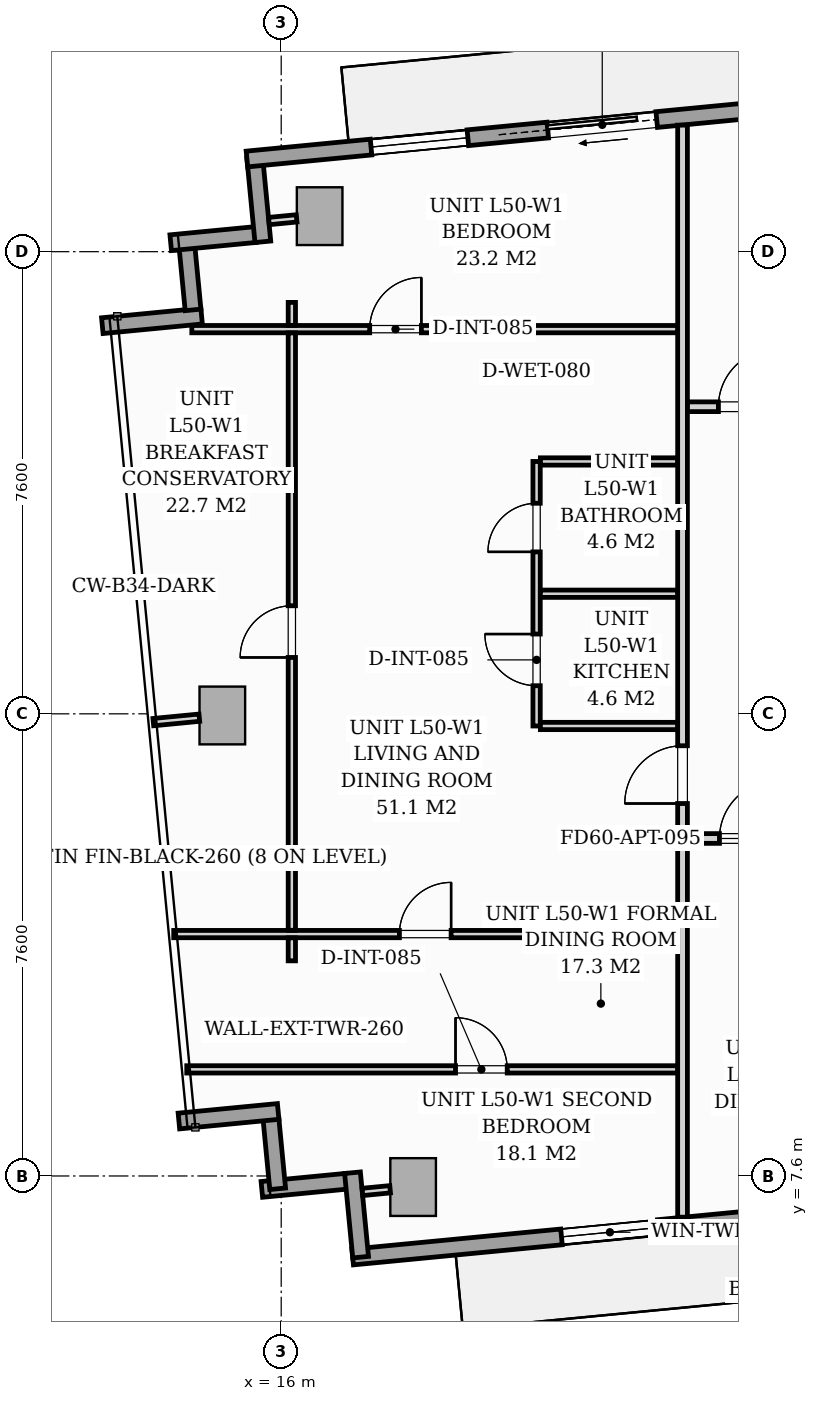
"""IFC4 building model, lengths in metres.
Left out: names, types, materials, properties, quantities, classifications, styles, units other than length and angle.
Written with IfcOpenShell. Run it as: python <this file> out.ifc"""

import sys

from ifc_helpers import new_model, si_unit, direction, frame, frame_2d, origin, origin_2d, place, context, subcontext, project, spatial, rectangle, extrude, source, transform, mapped, element, fill, save


model = new_model("IFC4")
c1 = context("Model", 3, precision=1e-05, world=origin(), true_north=direction((0.0, 1.0)))
c2 = subcontext(c1, "Body", "Model", "MODEL_VIEW")
j1 = project(units=[si_unit("LENGTHUNIT", "METRE"), si_unit("PLANEANGLEUNIT", "RADIAN")], contexts=[c1])
p1 = place(None, origin())
s1 = spatial("IfcSite", under=j1, at=p1, CompositionType="ELEMENT")
p2 = place(p1, origin())
s2 = spatial("IfcBuilding", under=s1, at=p2, CompositionType="ELEMENT")
p3 = place(p2, frame((0.0, 0.0, 176.2)))
s3 = spatial("IfcBuildingStorey", under=s2, at=p3, CompositionType="ELEMENT", Elevation=176.2)
m1 = source(origin(), c2, "Body", "SweptSolid", [
    extrude(rectangle(XDim=0.75, YDim=0.95, at=origin_2d()), origin(), (0.0, 0.0, 1.0), 3.196),
])
for number, where, z_axis, x_axis in (
    (1, (18.169, 7.418, 0.002), (0.0, 0.0, 1.0), (0.995, 0.096, 0.0)),
    (2, (16.632, 23.384, 0.002), (0.0, 0.0, 1.0), (0.995, 0.096, 0.0)),
    (3, (15.032, 15.173, 0.002), (0.0, 0.0, 1.0), (0.995, 0.096, 0.0)),
):
    element("IfcColumn", number, at=place(p3, frame(where, z_axis=z_axis, x_axis=x_axis)), inside=s3, PredefinedType="COLUMN", context=c2, shape_type="MappedRepresentation", body=[
        mapped(m1, transform((0.0, 0.0, 0.0), scale=1.0)),
    ])
p4 = place(p3, frame((17.07, 7.513, 0.0), z_axis=(0.0, 0.0, 1.0), x_axis=(-0.995391056452, -0.09589913835, 0.0)))
e4 = element("IfcWall", 4, at=p4, inside=s3, PredefinedType="STANDARD", context=c2, shape_type="SweptSolid", body=[
    extrude(rectangle(XDim=1.395, YDim=0.26, at=frame_2d((0.698, 0.0))), origin(), (0.0, 0.0, 1.0), 2.94),
])
p5 = place(p3, frame((15.942, 7.389, 0.0), z_axis=(0.0, 0.0, 1.0), x_axis=(-0.09576095695, 0.995404359607, 0.0)))
e5 = element("IfcWall", 5, at=p5, inside=s3, PredefinedType="STANDARD", context=c2, shape_type="SweptSolid", body=[
    extrude(rectangle(XDim=1.15, YDim=0.26, at=frame_2d((0.575, 0.0))), origin(), (0.0, 0.0, 1.0), 2.94),
])
for number, where, z_axis, x_axis in (
    (6, (15.95, 8.661, 0.0), (0.0, 0.0, 1.0), (-0.995, -0.096, 0.0)),
    (7, (13.058, 21.583, 0.0), (0.0, 0.0, 1.0), (0.995, 0.096, 0.0)),
):
    element("IfcWall", number, at=place(p3, frame(where, z_axis=z_axis, x_axis=x_axis)), inside=s3, PredefinedType="STANDARD", context=c2, shape_type="SweptSolid", body=[
        extrude(rectangle(XDim=1.64, YDim=0.26, at=frame_2d((0.82, 0.0))), origin(), (0.0, 0.0, 1.0), 2.94),
    ])
p6 = place(p3, frame((14.55, 21.843, 0.0), z_axis=(0.0, 0.0, 1.0), x_axis=(-0.09576095695, 0.995404359607, 0.0)))
e8 = element("IfcWall", 8, at=p6, inside=s3, PredefinedType="STANDARD", context=c2, shape_type="SweptSolid", body=[
    extrude(rectangle(XDim=1.15, YDim=0.26, at=frame_2d((0.575, 0.0))), origin(), (0.0, 0.0, 1.0), 2.94),
])
p7 = place(p3, frame((14.183, 22.947, 0.0), z_axis=(0.0, 0.0, 1.0), x_axis=(0.99540614245, 0.095742423056, 0.0)))
e9 = element("IfcWall", 9, at=p7, inside=s3, PredefinedType="STANDARD", context=c2, shape_type="SweptSolid", body=[
    extrude(rectangle(XDim=1.395, YDim=0.26, at=frame_2d((0.697, 0.0))), origin(), (0.0, 0.0, 1.0), 2.94),
])
p8 = place(p3, frame((15.698, 22.963, 0.0), z_axis=(0.0, 0.0, 1.0), x_axis=(-0.09589913835, 0.995391056452, 0.0)))
e10 = element("IfcWall", 10, at=p8, inside=s3, PredefinedType="STANDARD", context=c2, shape_type="SweptSolid", body=[
    extrude(rectangle(XDim=1.395, YDim=0.26, at=frame_2d((0.698, 0.0))), origin(), (0.0, 0.0, 1.0), 2.94),
])
p9 = place(p3, frame((15.437, 24.324, 0.0), z_axis=(0.0, 0.0, 1.0), x_axis=(0.995395627913, 0.095851676732, 0.0)))
e11 = element("IfcWall", 11, at=p9, inside=s3, PredefinedType="STANDARD", context=c2, shape_type="SweptSolid", body=[
    extrude(rectangle(XDim=16.1, YDim=0.26, at=frame_2d((8.05, 0.0))), origin(), (0.0, 0.0, 1.0), 2.94),
])
p10 = place(p9, frame((4.97, 0.0, 0.0)))
e12 = element("IfcOpeningElement", 12, at=p10, cuts=e11, PredefinedType="OPENING", context=c2, shape_type="SweptSolid", body=[
    extrude(rectangle(XDim=1.8, YDim=2.06, at=frame_2d((0.9, 1.03))), frame((0.0, 0.14, 0.0), z_axis=(0.0, -1.0, 0.0), x_axis=(1.0, 0.0, 0.0)), (0.0, 0.0, 1.0), 0.28),
])
p11 = place(p9, frame((2.05, 0.0, 0.65)))
e13 = element("IfcOpeningElement", 13, at=p11, cuts=e11, PredefinedType="OPENING", context=c2, shape_type="SweptSolid", body=[
    extrude(rectangle(XDim=1.6, YDim=1.5, at=frame_2d((0.8, 0.75))), frame((0.0, 0.14, 0.0), z_axis=(0.0, -1.0, 0.0), x_axis=(1.0, 0.0, 0.0)), (0.0, 0.0, 1.0), 0.28),
])
p12 = place(p3, frame((33.201, 7.81, 0.0), z_axis=(0.0, 0.0, 1.0), x_axis=(-0.995397074604, -0.095836652014, 0.0)))
e14 = element("IfcWall", 14, at=p12, inside=s3, PredefinedType="STANDARD", context=c2, shape_type="SweptSolid", body=[
    extrude(rectangle(XDim=16.1, YDim=0.26, at=frame_2d((8.05, 0.0))), origin(), (0.0, 0.0, 1.0), 2.94),
])
p13 = place(p12, frame((6.51, 0.0, 0.0)))
e15 = element("IfcOpeningElement", 15, at=p13, cuts=e14, PredefinedType="OPENING", context=c2, shape_type="SweptSolid", body=[
    extrude(rectangle(XDim=1.8, YDim=2.06, at=frame_2d((0.9, 1.03))), frame((0.0, 0.14, 0.0), z_axis=(0.0, -1.0, 0.0), x_axis=(1.0, 0.0, 0.0)), (0.0, 0.0, 1.0), 0.28),
])
p14 = place(p12, frame((11.05, 0.0, 0.65)))
e16 = element("IfcOpeningElement", 16, at=p14, cuts=e14, PredefinedType="OPENING", context=c2, shape_type="SweptSolid", body=[
    extrude(rectangle(XDim=1.6, YDim=1.5, at=frame_2d((0.8, 0.75))), frame((0.0, 0.14, 0.0), z_axis=(0.0, -1.0, 0.0), x_axis=(1.0, 0.0, 0.0)), (0.0, 0.0, 1.0), 0.28),
])
p15 = place(p12, frame((2.213, 0.0, 0.75)))
e17 = element("IfcOpeningElement", 17, at=p15, cuts=e14, PredefinedType="OPENING", context=c2, shape_type="SweptSolid", body=[
    extrude(rectangle(XDim=1.6, YDim=1.5, at=frame_2d((0.8, 0.75))), frame((0.0, 0.14, 0.0), z_axis=(0.0, -1.0, 0.0), x_axis=(1.0, 0.0, 0.0)), (0.0, 0.0, 1.0), 0.28),
])
p16 = place(p3, frame((17.306, 6.265, 0.0), z_axis=(0.0, 0.0, 1.0), x_axis=(-0.095915846097, 0.995389446633, 0.0)))
e18 = element("IfcWall", 18, at=p16, inside=s3, PredefinedType="STANDARD", context=c2, shape_type="SweptSolid", body=[
    extrude(rectangle(XDim=1.395, YDim=0.26, at=frame_2d((0.697, 0.0))), origin(), (0.0, 0.0, 1.0), 2.94),
])
p17 = place(p3, frame((22.6, 13.15, 0.0), z_axis=(0.0, 0.0, 1.0), x_axis=(1.0, 0.0, 0.0)))
e19 = element("IfcWall", 19, at=p17, inside=s3, PredefinedType="PARTITIONING", context=c2, shape_type="SweptSolid", body=[
    extrude(rectangle(XDim=23.28, YDim=0.16, at=frame_2d((11.64, 0.0))), origin(), (0.0, 0.0, 1.0), 2.94),
])
p18 = place(p17, frame((0.607, 0.0, 0.0)))
e20 = element("IfcOpeningElement", 20, at=p18, cuts=e19, PredefinedType="OPENING", context=c2, shape_type="SweptSolid", body=[
    extrude(rectangle(XDim=0.95, YDim=2.06, at=frame_2d((0.475, 1.03))), frame((0.0, 0.09, 0.0), z_axis=(0.0, -1.0, 0.0), x_axis=(1.0, 0.0, 0.0)), (0.0, 0.0, 1.0), 0.18),
])
p19 = place(p17, frame((11.717, 0.0, 0.0)))
e21 = element("IfcOpeningElement", 21, at=p19, cuts=e19, PredefinedType="OPENING", context=c2, shape_type="SweptSolid", body=[
    extrude(rectangle(XDim=0.95, YDim=2.06, at=frame_2d((0.475, 1.03))), frame((0.0, 0.09, 0.0), z_axis=(0.0, -1.0, 0.0), x_axis=(1.0, 0.0, 0.0)), (0.0, 0.0, 1.0), 0.18),
])
p20 = place(p3, frame((22.6, 6.922, 0.0), z_axis=(0.0, 0.0, 1.0), x_axis=(0.0, 1.0, 0.0)))
e22 = element("IfcWall", 22, at=p20, inside=s3, PredefinedType="PARTITIONING", context=c2, shape_type="SweptSolid", body=[
    extrude(rectangle(XDim=6.146, YDim=0.16, at=frame_2d((3.073, 0.0))), origin(), (0.0, 0.0, 1.0), 2.94),
])
p21 = place(p3, frame((22.6, 13.232, 0.0), z_axis=(0.0, 0.0, 1.0), x_axis=(0.0, 1.0, 0.0)))
e23 = element("IfcWall", 23, at=p21, inside=s3, PredefinedType="PARTITIONING", context=c2, shape_type="SweptSolid", body=[
    extrude(rectangle(XDim=11.649, YDim=0.16, at=frame_2d((5.824, 0.0))), origin(), (0.0, 0.0, 1.0), 2.94),
])
p22 = place(p21, frame((0.493, 0.0, 0.0)))
e24 = element("IfcOpeningElement", 24, at=p22, cuts=e23, PredefinedType="OPENING", context=c2, shape_type="SweptSolid", body=[
    extrude(rectangle(XDim=0.95, YDim=2.06, at=frame_2d((0.475, 1.03))), frame((0.0, 0.09, 0.0), z_axis=(0.0, -1.0, 0.0), x_axis=(1.0, 0.0, 0.0)), (0.0, 0.0, 1.0), 0.18),
])
p23 = place(p3, frame((20.2, 15.0, 0.0), z_axis=(0.0, 0.0, 1.0), x_axis=(0.0, 1.0, 0.0)))
e25 = element("IfcWall", 25, at=p23, inside=s3, PredefinedType="PARTITIONING", context=c2, shape_type="SweptSolid", body=[
    extrude(rectangle(XDim=4.35, YDim=0.12, at=frame_2d((2.175, 0.0))), origin(), (0.0, 0.0, 1.0), 2.94),
])
p24 = place(p23, frame((0.662, 0.0, 0.0)))
e26 = element("IfcOpeningElement", 26, at=p24, cuts=e25, PredefinedType="OPENING", context=c2, shape_type="SweptSolid", body=[
    extrude(rectangle(XDim=0.85, YDim=2.05, at=frame_2d((0.425, 1.025))), frame((0.0, 0.07, 0.0), z_axis=(0.0, -1.0, 0.0), x_axis=(1.0, 0.0, 0.0)), (0.0, 0.0, 1.0), 0.14),
])
p25 = place(p23, frame((2.863, 0.0, 0.0)))
e27 = element("IfcOpeningElement", 27, at=p25, cuts=e25, PredefinedType="OPENING", context=c2, shape_type="SweptSolid", body=[
    extrude(rectangle(XDim=0.8, YDim=2.02, at=frame_2d((0.4, 1.01))), frame((0.0, 0.07, 0.0), z_axis=(0.0, -1.0, 0.0), x_axis=(1.0, 0.0, 0.0)), (0.0, 0.0, 1.0), 0.14),
])
for number, where, z_axis, x_axis in (
    (28, (20.262, 17.175, 0.0), (0.0, 0.0, 1.0), (1.0, 0.0, 0.0)),
    (29, (20.262, 15.0, 0.0), (0.0, 0.0, 1.0), (1.0, 0.0, 0.0)),
    (30, (20.262, 19.35, 0.0), (0.0, 0.0, 1.0), (1.0, 0.0, 0.0)),
):
    element("IfcWall", number, at=place(p3, frame(where, z_axis=z_axis, x_axis=x_axis)), inside=s3, PredefinedType="PARTITIONING", context=c2, shape_type="SweptSolid", body=[
        extrude(rectangle(XDim=2.256, YDim=0.12, at=frame_2d((1.128, 0.0))), origin(), (0.0, 0.0, 1.0), 2.94),
    ])
p26 = place(p3, frame((14.53, 21.526, 0.0), z_axis=(0.0, 0.0, 1.0), x_axis=(1.0, 0.0, 0.0)))
e31 = element("IfcWall", 31, at=p26, inside=s3, PredefinedType="PARTITIONING", context=c2, shape_type="SweptSolid", body=[
    extrude(rectangle(XDim=7.988, YDim=0.12, at=frame_2d((3.994, 0.0))), origin(), (0.0, 0.0, 1.0), 2.94),
])
p27 = place(p26, frame((2.925, 0.0, 0.0)))
e32 = element("IfcOpeningElement", 32, at=p27, cuts=e31, PredefinedType="OPENING", context=c2, shape_type="SweptSolid", body=[
    extrude(rectangle(XDim=0.85, YDim=2.05, at=frame_2d((0.425, 1.025))), frame((0.0, 0.07, 0.0), z_axis=(0.0, -1.0, 0.0), x_axis=(1.0, 0.0, 0.0)), (0.0, 0.0, 1.0), 0.14),
])
p28 = place(p3, frame((14.447, 9.353, 0.0), z_axis=(0.0, 0.0, 1.0), x_axis=(1.0, 0.0, 0.0)))
e33 = element("IfcWall", 33, at=p28, inside=s3, PredefinedType="PARTITIONING", context=c2, shape_type="SweptSolid", body=[
    extrude(rectangle(XDim=8.071, YDim=0.12, at=frame_2d((4.036, 0.0))), origin(), (0.0, 0.0, 1.0), 2.94),
])
p29 = place(p28, frame((4.42, 0.0, 0.0)))
e34 = element("IfcOpeningElement", 34, at=p29, cuts=e33, PredefinedType="OPENING", context=c2, shape_type="SweptSolid", body=[
    extrude(rectangle(XDim=0.85, YDim=2.05, at=frame_2d((0.425, 1.025))), frame((0.0, 0.07, 0.0), z_axis=(0.0, -1.0, 0.0), x_axis=(1.0, 0.0, 0.0)), (0.0, 0.0, 1.0), 0.14),
])
p30 = place(p3, frame((14.233, 11.578, 0.0), z_axis=(0.0, 0.0, 1.0), x_axis=(1.0, 0.0, 0.0)))
e35 = element("IfcWall", 35, at=p30, inside=s3, PredefinedType="PARTITIONING", context=c2, shape_type="SweptSolid", body=[
    extrude(rectangle(XDim=8.285, YDim=0.12, at=frame_2d((4.143, 0.0))), origin(), (0.0, 0.0, 1.0), 2.94),
])
p31 = place(p30, frame((3.711, 0.0, 0.0)))
e36 = element("IfcOpeningElement", 36, at=p31, cuts=e35, PredefinedType="OPENING", context=c2, shape_type="SweptSolid", body=[
    extrude(rectangle(XDim=0.85, YDim=2.05, at=frame_2d((0.425, 1.025))), frame((0.0, 0.07, 0.0), z_axis=(0.0, -1.0, 0.0), x_axis=(1.0, 0.0, 0.0)), (0.0, 0.0, 1.0), 0.14),
])
p32 = place(p3, frame((16.175, 11.138, 0.0), z_axis=(0.0, 0.0, 1.0), x_axis=(0.0, 1.0, 0.0)))
e37 = element("IfcWall", 37, at=p32, inside=s3, PredefinedType="PARTITIONING", context=c2, shape_type="SweptSolid", body=[
    extrude(rectangle(XDim=0.378, YDim=0.12, at=frame_2d((0.189, 0.0))), origin(), (0.0, 0.0, 1.0), 2.94),
])
p33 = place(p3, frame((16.175, 11.64, 0.0), z_axis=(0.0, 0.0, 1.0), x_axis=(0.0, 1.0, 0.0)))
e38 = element("IfcWall", 38, at=p33, inside=s3, PredefinedType="PARTITIONING", context=c2, shape_type="SweptSolid", body=[
    extrude(rectangle(XDim=9.824, YDim=0.12, at=frame_2d((4.912, 0.0))), origin(), (0.0, 0.0, 1.0), 2.383),
])
p34 = place(p33, frame((4.487, 0.0, 0.0)))
e39 = element("IfcOpeningElement", 39, at=p34, cuts=e38, PredefinedType="OPENING", context=c2, shape_type="SweptSolid", body=[
    extrude(rectangle(XDim=0.85, YDim=2.05, at=frame_2d((0.425, 1.025))), frame((0.0, 0.07, 0.0), z_axis=(0.0, -1.0, 0.0), x_axis=(1.0, 0.0, 0.0)), (0.0, 0.0, 1.0), 0.14),
])
p35 = place(p3, frame((16.175, 21.588, 0.0), z_axis=(0.0, 0.0, 1.0), x_axis=(0.0, 1.0, 0.0)))
e40 = element("IfcWall", 40, at=p35, inside=s3, PredefinedType="PARTITIONING", context=c2, shape_type="SweptSolid", body=[
    extrude(rectangle(XDim=0.378, YDim=0.12, at=frame_2d((0.189, 0.0))), origin(), (0.0, 0.0, 1.0), 2.94),
])
p36 = place(p3, frame((22.682, 20.25, 0.0), z_axis=(0.0, 0.0, 1.0), x_axis=(1.0, 0.0, 0.0)))
e41 = element("IfcWall", 41, at=p36, inside=s3, PredefinedType="PARTITIONING", context=c2, shape_type="SweptSolid", body=[
    extrude(rectangle(XDim=1.886, YDim=0.16, at=frame_2d((0.943, 0.0))), origin(), (0.0, 0.0, 1.0), 2.94),
])
p37 = place(p36, frame((0.508, 0.0, 0.0)))
e42 = element("IfcOpeningElement", 42, at=p37, cuts=e41, PredefinedType="OPENING", context=c2, shape_type="SweptSolid", body=[
    extrude(rectangle(XDim=0.95, YDim=2.06, at=frame_2d((0.475, 1.03))), frame((0.0, 0.09, 0.0), z_axis=(0.0, -1.0, 0.0), x_axis=(1.0, 0.0, 0.0)), (0.0, 0.0, 1.0), 0.18),
])
for number, where, z_axis, x_axis in (
    (43, (17.791, 7.382, 0.0), (0.0, 0.0, 1.0), (-0.995, -0.096, 0.0)),
    (44, (16.254, 23.348, 0.0), (0.0, 0.0, 1.0), (-0.995, -0.096, 0.0)),
):
    element("IfcWall", number, at=place(p3, frame(where, z_axis=z_axis, x_axis=x_axis)), inside=s3, PredefinedType="PARTITIONING", context=c2, shape_type="SweptSolid", body=[
        extrude(rectangle(XDim=0.458, YDim=0.12, at=frame_2d((0.229, 0.0))), origin(), (0.0, 0.0, 1.0), 2.94),
    ])
p38 = place(p3, frame((14.654, 15.136, 0.0), z_axis=(0.0, 0.0, 1.0), x_axis=(-0.995408440582, -0.095718527039, 0.0)))
e45 = element("IfcWall", 45, at=p38, inside=s3, PredefinedType="PARTITIONING", context=c2, shape_type="SweptSolid", body=[
    extrude(rectangle(XDim=0.76, YDim=0.12, at=frame_2d((0.38, 0.0))), origin(), (0.0, 0.0, 1.0), 2.94),
])
m2 = source(origin(), c2, "Body", "SweptSolid", [
    extrude(rectangle(XDim=1.8, YDim=2.06, at=frame_2d((0.9, 1.03))), frame((0.0, 0.025, 0.0), z_axis=(0.0, -1.0, 0.0), x_axis=(1.0, 0.0, 0.0)), (0.0, 0.0, 1.0), 0.05),
])
p39 = place(p10, origin())
e46 = element("IfcDoor", 46, at=p39, inside=s3, OperationType="SLIDING_TO_LEFT", PredefinedType="DOOR", context=c2, shape_type="MappedRepresentation", body=[
    mapped(m2, transform((0.0, 0.0, 0.0), scale=1.0)),
])
fill(e12, e46)
m3 = source(origin(), c2, "Body", "SweptSolid", [
    extrude(rectangle(XDim=1.6, YDim=1.5, at=frame_2d((0.8, 0.75))), frame((0.0, 0.03, 0.0), z_axis=(0.0, -1.0, 0.0), x_axis=(1.0, 0.0, 0.0)), (0.0, 0.0, 1.0), 0.06),
])
p40 = place(p11, origin())
e47 = element("IfcWindow", 47, at=p40, inside=s3, PartitioningType="SINGLE_PANEL", PredefinedType="WINDOW", context=c2, shape_type="MappedRepresentation", body=[
    mapped(m3, transform((0.0, 0.0, 0.0), scale=1.0)),
])
fill(e13, e47)
p41 = place(p14, origin())
e48 = element("IfcWindow", 48, at=p41, inside=s3, PartitioningType="SINGLE_PANEL", PredefinedType="WINDOW", context=c2, shape_type="MappedRepresentation", body=[
    mapped(m3, transform((0.0, 0.0, 0.0), scale=1.0)),
])
fill(e16, e48)
m4 = source(origin(), c2, "Body", "SweptSolid", [
    extrude(rectangle(XDim=0.95, YDim=2.06, at=frame_2d((0.475, 1.03))), frame((0.0, 0.025, 0.0), z_axis=(0.0, -1.0, 0.0), x_axis=(1.0, 0.0, 0.0)), (0.0, 0.0, 1.0), 0.05),
])
p42 = place(p18, origin())
e49 = element("IfcDoor", 49, at=p42, inside=s3, OperationType="SINGLE_SWING_RIGHT", PredefinedType="DOOR", context=c2, shape_type="MappedRepresentation", body=[
    mapped(m4, transform((0.0, 0.0, 0.0), scale=1.0)),
])
fill(e20, e49)
p43 = place(p22, origin())
e50 = element("IfcDoor", 50, at=p43, inside=s3, OperationType="SINGLE_SWING_LEFT", PredefinedType="DOOR", context=c2, shape_type="MappedRepresentation", body=[
    mapped(m4, transform((0.0, 0.0, 0.0), scale=1.0)),
])
fill(e24, e50)
m5 = source(origin(), c2, "Body", "SweptSolid", [
    extrude(rectangle(XDim=0.85, YDim=2.05, at=frame_2d((0.425, 1.025))), frame((0.0, 0.025, 0.0), z_axis=(0.0, -1.0, 0.0), x_axis=(1.0, 0.0, 0.0)), (0.0, 0.0, 1.0), 0.05),
])
p44 = place(p24, origin())
e51 = element("IfcDoor", 51, at=p44, inside=s3, OperationType="SINGLE_SWING_RIGHT", PredefinedType="DOOR", context=c2, shape_type="MappedRepresentation", body=[
    mapped(m5, transform((0.0, 0.0, 0.0), scale=1.0)),
])
fill(e26, e51)
m6 = source(origin(), c2, "Body", "SweptSolid", [
    extrude(rectangle(XDim=0.8, YDim=2.02, at=frame_2d((0.4, 1.01))), frame((0.0, 0.025, 0.0), z_axis=(0.0, -1.0, 0.0), x_axis=(1.0, 0.0, 0.0)), (0.0, 0.0, 1.0), 0.05),
])
p45 = place(p25, origin())
e52 = element("IfcDoor", 52, at=p45, inside=s3, OperationType="SINGLE_SWING_LEFT", PredefinedType="DOOR", context=c2, shape_type="MappedRepresentation", body=[
    mapped(m6, transform((0.0, 0.0, 0.0), scale=1.0)),
])
fill(e27, e52)
p46 = place(p27, origin())
e53 = element("IfcDoor", 53, at=p46, inside=s3, OperationType="SINGLE_SWING_RIGHT", PredefinedType="DOOR", context=c2, shape_type="MappedRepresentation", body=[
    mapped(m5, transform((0.0, 0.0, 0.0), scale=1.0)),
])
fill(e32, e53)
p47 = place(p29, origin())
e54 = element("IfcDoor", 54, at=p47, inside=s3, OperationType="SINGLE_SWING_LEFT", PredefinedType="DOOR", context=c2, shape_type="MappedRepresentation", body=[
    mapped(m5, transform((0.0, 0.0, 0.0), scale=1.0)),
])
fill(e34, e54)
p48 = place(p31, origin())
e55 = element("IfcDoor", 55, at=p48, inside=s3, OperationType="SINGLE_SWING_RIGHT", PredefinedType="DOOR", context=c2, shape_type="MappedRepresentation", body=[
    mapped(m5, transform((0.0, 0.0, 0.0), scale=1.0)),
])
fill(e36, e55)
p49 = place(p34, origin())
e56 = element("IfcDoor", 56, at=p49, inside=s3, OperationType="SINGLE_SWING_LEFT", PredefinedType="DOOR", context=c2, shape_type="MappedRepresentation", body=[
    mapped(m5, transform((0.0, 0.0, 0.0), scale=1.0)),
])
fill(e39, e56)
p50 = place(p37, origin())
e57 = element("IfcDoor", 57, at=p50, inside=s3, OperationType="SINGLE_SWING_RIGHT", PredefinedType="DOOR", context=c2, shape_type="MappedRepresentation", body=[
    mapped(m4, transform((0.0, 0.0, 0.0), scale=1.0)),
])
fill(e42, e57)
save(model, sys.argv[1])
